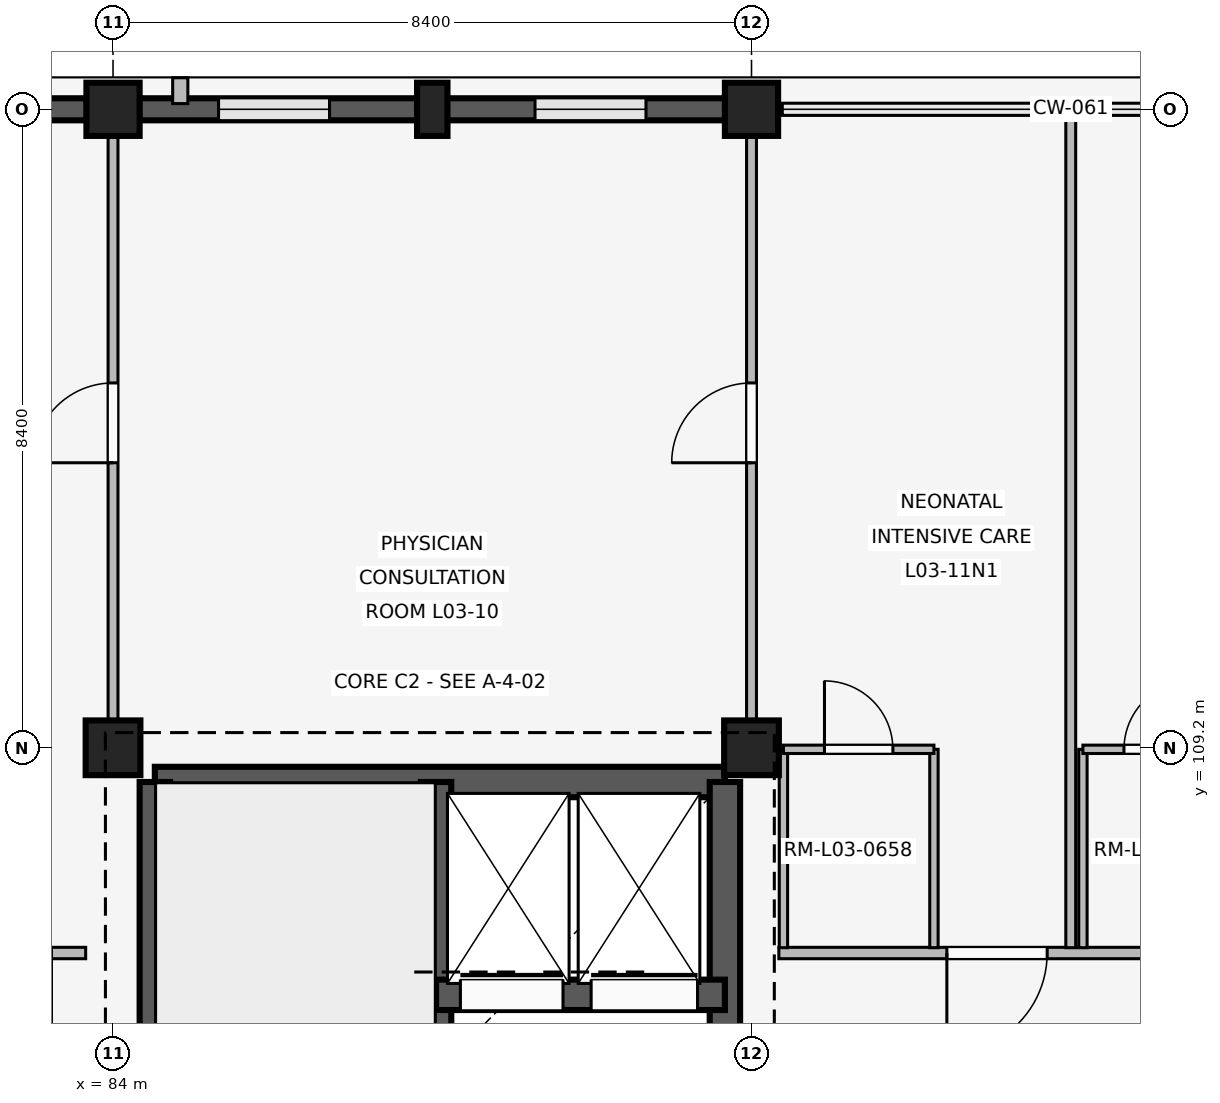
"""IFC4 building model, lengths in metres.
Left out: names, types, materials, properties, quantities, classifications, styles, units other than length and angle.
Written with IfcOpenShell. Run it as: python <this file> out.ifc"""

import sys

from ifc_helpers import new_model, si_unit, direction, frame, frame_2d, origin, origin_2d, place, context, subcontext, project, spatial, rectangle, extrude, element, fill, save


model = new_model("IFC4")
c1 = context("Model", 3, precision=1e-05, world=origin(), true_north=direction((0.0, 1.0)))
c2 = subcontext(c1, "Body", "Model", "MODEL_VIEW")
j1 = project(units=[si_unit("LENGTHUNIT", "METRE"), si_unit("PLANEANGLEUNIT", "RADIAN")], contexts=[c1])
p1 = place(None, origin())
s1 = spatial("IfcSite", under=j1, at=p1, CompositionType="ELEMENT")
p2 = place(p1, origin())
s2 = spatial("IfcBuilding", under=s1, at=p2, CompositionType="ELEMENT")
p3 = place(p2, frame((0.0, 0.0, 12.9)))
s3 = spatial("IfcBuildingStorey", under=s2, at=p3, CompositionType="ELEMENT", Elevation=12.9)
p4 = place(p3, frame((84.0, 109.2, 0.0), z_axis=(0.0, 0.0, 1.0), x_axis=(1.0, 0.0, 0.0)))
e1 = element("IfcColumn", 1, at=p4, inside=s3, PredefinedType="COLUMN", context=c2, shape_type="SweptSolid", body=[
    extrude(rectangle(XDim=0.72, YDim=0.72, at=origin_2d()), origin(), (0.0, 0.0, 1.0), 3.3),
])
p5 = place(p3, frame((84.0, 117.6, 0.0), z_axis=(0.0, 0.0, 1.0), x_axis=(1.0, 0.0, 0.0)))
e2 = element("IfcColumn", 2, at=p5, inside=s3, PredefinedType="COLUMN", context=c2, shape_type="SweptSolid", body=[
    extrude(rectangle(XDim=0.7, YDim=0.7, at=origin_2d()), origin(), (0.0, 0.0, 1.0), 3.3),
])
p6 = place(p3, frame((92.4, 109.2, 0.0), z_axis=(0.0, 0.0, 1.0), x_axis=(1.0, 0.0, 0.0)))
e3 = element("IfcColumn", 3, at=p6, inside=s3, PredefinedType="COLUMN", context=c2, shape_type="SweptSolid", body=[
    extrude(rectangle(XDim=0.72, YDim=0.72, at=origin_2d()), origin(), (0.0, 0.0, 1.0), 3.3),
])
p7 = place(p3, frame((92.4, 117.6, 0.0), z_axis=(0.0, 0.0, 1.0), x_axis=(1.0, 0.0, 0.0)))
e4 = element("IfcColumn", 4, at=p7, inside=s3, PredefinedType="COLUMN", context=c2, shape_type="SweptSolid", body=[
    extrude(rectangle(XDim=0.7, YDim=0.7, at=origin_2d()), origin(), (0.0, 0.0, 1.0), 3.3),
])
p8 = place(p3, frame((88.2, 117.6, 0.0), z_axis=(0.0, 0.0, 1.0), x_axis=(1.0, 0.0, 0.0)))
e5 = element("IfcColumn", 5, at=p8, inside=s3, PredefinedType="PILASTER", context=c2, shape_type="SweptSolid", body=[
    extrude(rectangle(XDim=0.4, YDim=0.7, at=origin_2d()), origin(), (0.0, 0.0, 1.0), 3.3),
])
p9 = place(p3, frame((75.945, 117.6, 0.0), z_axis=(0.0, 0.0, 1.0), x_axis=(1.0, 0.0, 0.0)))
e6 = element("IfcWall", 6, at=p9, inside=s3, PredefinedType="SOLIDWALL", context=c2, shape_type="SweptSolid", body=[
    extrude(rectangle(XDim=7.71, YDim=0.29, at=frame_2d((3.855, 0.0))), origin(), (0.0, 0.0, 1.0), 2.44),
])
p10 = place(p9, frame((0.963, 0.0, 0.85)))
e7 = element("IfcOpeningElement", 7, at=p10, cuts=e6, PredefinedType="OPENING", context=c2, shape_type="SweptSolid", body=[
    extrude(rectangle(XDim=1.62, YDim=0.95, at=frame_2d((0.81, 0.475))), frame((0.0, 0.155, 0.0), z_axis=(0.0, -1.0, 0.0), x_axis=(1.0, 0.0, 0.0)), (0.0, 0.0, 1.0), 0.31),
])
p11 = place(p9, frame((5.127, 0.0, 0.85)))
e8 = element("IfcOpeningElement", 8, at=p11, cuts=e6, PredefinedType="OPENING", context=c2, shape_type="SweptSolid", body=[
    extrude(rectangle(XDim=1.62, YDim=0.95, at=frame_2d((0.81, 0.475))), frame((0.0, 0.155, 0.0), z_axis=(0.0, -1.0, 0.0), x_axis=(1.0, 0.0, 0.0)), (0.0, 0.0, 1.0), 0.31),
])
p12 = place(p3, frame((84.345, 117.6, 0.0), z_axis=(0.0, 0.0, 1.0), x_axis=(1.0, 0.0, 0.0)))
e9 = element("IfcWall", 9, at=p12, inside=s3, PredefinedType="SOLIDWALL", context=c2, shape_type="SweptSolid", body=[
    extrude(rectangle(XDim=7.71, YDim=0.29, at=frame_2d((3.855, 0.0))), origin(), (0.0, 0.0, 1.0), 2.44),
])
p13 = place(p12, frame((1.043, 0.0, 0.85)))
e10 = element("IfcOpeningElement", 10, at=p13, cuts=e9, PredefinedType="OPENING", context=c2, shape_type="SweptSolid", body=[
    extrude(rectangle(XDim=1.46, YDim=0.85, at=frame_2d((0.73, 0.425))), frame((0.0, 0.155, 0.0), z_axis=(0.0, -1.0, 0.0), x_axis=(1.0, 0.0, 0.0)), (0.0, 0.0, 1.0), 0.31),
])
p14 = place(p12, frame((5.207, 0.0, 0.85)))
e11 = element("IfcOpeningElement", 11, at=p14, cuts=e9, PredefinedType="OPENING", context=c2, shape_type="SweptSolid", body=[
    extrude(rectangle(XDim=1.46, YDim=0.85, at=frame_2d((0.73, 0.425))), frame((0.0, 0.155, 0.0), z_axis=(0.0, -1.0, 0.0), x_axis=(1.0, 0.0, 0.0)), (0.0, 0.0, 1.0), 0.31),
])
p15 = place(p3, frame((84.885, 117.675, 0.0), z_axis=(0.0, 0.0, 1.0), x_axis=(0.0, 1.0, 0.0)))
e12 = element("IfcWall", 12, at=p15, inside=s3, PredefinedType="ELEMENTEDWALL", context=c2, shape_type="SweptSolid", body=[
    extrude(rectangle(XDim=0.34, YDim=0.2, at=frame_2d((0.17, 0.0))), origin(), (0.0, 0.0, 1.0), 2.42),
])
p16 = place(p3, frame((84.55, 108.75, 0.0), z_axis=(0.0, 0.0, 1.0), x_axis=(1.0, 0.0, 0.0)))
e13 = element("IfcWall", 13, at=p16, inside=s3, PredefinedType="SHEAR", context=c2, shape_type="SweptSolid", body=[
    extrude(rectangle(XDim=7.5, YDim=0.4, at=frame_2d((3.75, 0.0))), origin(), (0.0, 0.0, 1.0), 3.02),
])
p17 = place(p3, frame((84.55, 101.2, 0.0), z_axis=(0.0, 0.0, 1.0), x_axis=(0.0, 1.0, 0.0)))
e14 = element("IfcWall", 14, at=p17, inside=s3, PredefinedType="SHEAR", context=c2, shape_type="SweptSolid", body=[
    extrude(rectangle(XDim=7.55, YDim=0.4, at=frame_2d((3.775, 0.0))), origin(), (0.0, 0.0, 1.0), 3.02),
])
p18 = place(p17, frame((0.28, 0.0, 0.0)))
e15 = element("IfcOpeningElement", 15, at=p18, cuts=e14, PredefinedType="OPENING", context=c2, shape_type="SweptSolid", body=[
    extrude(rectangle(XDim=1.0, YDim=2.15, at=frame_2d((0.5, 1.075))), frame((0.0, 0.21, 0.0), z_axis=(0.0, -1.0, 0.0), x_axis=(1.0, 0.0, 0.0)), (0.0, 0.0, 1.0), 0.42),
])
p19 = place(p3, frame((92.05, 101.2, 0.0), z_axis=(0.0, 0.0, 1.0), x_axis=(0.0, 1.0, 0.0)))
e16 = element("IfcWall", 16, at=p19, inside=s3, PredefinedType="SHEAR", context=c2, shape_type="SweptSolid", body=[
    extrude(rectangle(XDim=7.55, YDim=0.4, at=frame_2d((3.775, 0.0))), origin(), (0.0, 0.0, 1.0), 3.02),
])
p20 = place(p19, frame((2.4, 0.0, 0.0)))
e17 = element("IfcOpeningElement", 17, at=p20, cuts=e16, PredefinedType="OPENING", context=c2, shape_type="SweptSolid", body=[
    extrude(rectangle(XDim=1.2, YDim=2.2, at=frame_2d((0.6, 1.1))), frame((0.0, 0.21, 0.0), z_axis=(0.0, -1.0, 0.0), x_axis=(1.0, 0.0, 0.0)), (0.0, 0.0, 1.0), 0.42),
])
p21 = place(p3, frame((88.25, 101.2, 0.0), z_axis=(0.0, 0.0, 1.0), x_axis=(0.0, 1.0, 0.0)))
e18 = element("IfcWall", 18, at=p21, inside=s3, PredefinedType="SHEAR", context=c2, shape_type="SweptSolid", body=[
    extrude(rectangle(XDim=7.55, YDim=0.4, at=frame_2d((3.775, 0.0))), origin(), (0.0, 0.0, 1.0), 3.02),
])
p22 = place(p21, frame((0.28, 0.0, 0.0)))
e19 = element("IfcOpeningElement", 19, at=p22, cuts=e18, PredefinedType="OPENING", context=c2, shape_type="SweptSolid", body=[
    extrude(rectangle(XDim=1.0, YDim=2.15, at=frame_2d((0.5, 1.075))), frame((0.0, 0.21, 0.0), z_axis=(0.0, -1.0, 0.0), x_axis=(1.0, 0.0, 0.0)), (0.0, 0.0, 1.0), 0.42),
])
p23 = place(p3, frame((88.25, 105.95, 0.0), z_axis=(0.0, 0.0, 1.0), x_axis=(1.0, 0.0, 0.0)))
e20 = element("IfcWall", 20, at=p23, inside=s3, PredefinedType="SHEAR", context=c2, shape_type="SweptSolid", body=[
    extrude(rectangle(XDim=3.8, YDim=0.4, at=frame_2d((1.9, 0.0))), origin(), (0.0, 0.0, 1.0), 3.02),
])
p24 = place(p23, frame((0.32, 0.0, 0.0)))
e21 = element("IfcOpeningElement", 21, at=p24, cuts=e20, PredefinedType="OPENING", context=c2, shape_type="SweptSolid", body=[
    extrude(rectangle(XDim=1.35, YDim=2.25, at=frame_2d((0.675, 1.125))), frame((0.0, 0.21, 0.0), z_axis=(0.0, -1.0, 0.0), x_axis=(1.0, 0.0, 0.0)), (0.0, 0.0, 1.0), 0.42),
])
p25 = place(p23, frame((2.04, 0.0, 0.0)))
e22 = element("IfcOpeningElement", 22, at=p25, cuts=e20, PredefinedType="OPENING", context=c2, shape_type="SweptSolid", body=[
    extrude(rectangle(XDim=1.4, YDim=2.25, at=frame_2d((0.7, 1.125))), frame((0.0, 0.21, 0.0), z_axis=(0.0, -1.0, 0.0), x_axis=(1.0, 0.0, 0.0)), (0.0, 0.0, 1.0), 0.42),
])
p26 = place(p3, frame((83.64, 106.5, 0.0), z_axis=(0.0, 0.0, 1.0), x_axis=(-1.0, 0.0, 0.0)))
e23 = element("IfcWall", 23, at=p26, inside=s3, PredefinedType="PARTITIONING", context=c2, shape_type="SweptSolid", body=[
    extrude(rectangle(XDim=7.96, YDim=0.15, at=frame_2d((3.98, 0.0))), origin(), (0.0, 0.0, 1.0), 2.42),
])
p27 = place(p26, frame((0.45, 0.0, 0.0)))
e24 = element("IfcOpeningElement", 24, at=p27, cuts=e23, PredefinedType="OPENING", context=c2, shape_type="SweptSolid", body=[
    extrude(rectangle(XDim=1.32, YDim=2.25, at=frame_2d((0.66, 1.125))), frame((0.0, 0.085, 0.0), z_axis=(0.0, -1.0, 0.0), x_axis=(1.0, 0.0, 0.0)), (0.0, 0.0, 1.0), 0.17),
])
p28 = place(p26, frame((4.15, 0.0, 0.0)))
e25 = element("IfcOpeningElement", 25, at=p28, cuts=e23, PredefinedType="OPENING", context=c2, shape_type="SweptSolid", body=[
    extrude(rectangle(XDim=1.32, YDim=2.25, at=frame_2d((0.66, 1.125))), frame((0.0, 0.085, 0.0), z_axis=(0.0, -1.0, 0.0), x_axis=(1.0, 0.0, 0.0)), (0.0, 0.0, 1.0), 0.17),
])
p29 = place(p3, frame((84.0, 109.55, 0.0), z_axis=(0.0, 0.0, 1.0), x_axis=(0.0, 1.0, 0.0)))
e26 = element("IfcWall", 26, at=p29, inside=s3, PredefinedType="PARTITIONING", context=c2, shape_type="SweptSolid", body=[
    extrude(rectangle(XDim=7.91, YDim=0.13, at=frame_2d((3.955, 0.0))), origin(), (0.0, 0.0, 1.0), 2.42),
])
p30 = place(p29, frame((3.4, 0.0, 0.0)))
e27 = element("IfcOpeningElement", 27, at=p30, cuts=e26, PredefinedType="OPENING", context=c2, shape_type="SweptSolid", body=[
    extrude(rectangle(XDim=1.05, YDim=2.2, at=frame_2d((0.525, 1.1))), frame((0.0, 0.075, 0.0), z_axis=(0.0, -1.0, 0.0), x_axis=(1.0, 0.0, 0.0)), (0.0, 0.0, 1.0), 0.15),
])
p31 = place(p3, frame((92.4, 109.55, 0.0), z_axis=(0.0, 0.0, 1.0), x_axis=(0.0, 1.0, 0.0)))
e28 = element("IfcWall", 28, at=p31, inside=s3, PredefinedType="PARTITIONING", context=c2, shape_type="SweptSolid", body=[
    extrude(rectangle(XDim=7.91, YDim=0.13, at=frame_2d((3.955, 0.0))), origin(), (0.0, 0.0, 1.0), 2.42),
])
p32 = place(p31, frame((3.4, 0.0, 0.0)))
e29 = element("IfcOpeningElement", 29, at=p32, cuts=e28, PredefinedType="OPENING", context=c2, shape_type="SweptSolid", body=[
    extrude(rectangle(XDim=1.05, YDim=2.2, at=frame_2d((0.525, 1.1))), frame((0.0, 0.075, 0.0), z_axis=(0.0, -1.0, 0.0), x_axis=(1.0, 0.0, 0.0)), (0.0, 0.0, 1.0), 0.15),
])
p33 = place(p3, frame((100.72, 106.5, 0.0), z_axis=(0.0, 0.0, 1.0), x_axis=(-1.0, 0.0, 0.0)))
e30 = element("IfcWall", 30, at=p33, inside=s3, PredefinedType="PARTITIONING", context=c2, shape_type="SweptSolid", body=[
    extrude(rectangle(XDim=7.96, YDim=0.15, at=frame_2d((3.98, 0.0))), origin(), (0.0, 0.0, 1.0), 2.42),
])
p34 = place(p33, frame((0.73, 0.0, 0.0)))
e31 = element("IfcOpeningElement", 31, at=p34, cuts=e30, PredefinedType="OPENING", context=c2, shape_type="SweptSolid", body=[
    extrude(rectangle(XDim=1.32, YDim=2.25, at=frame_2d((0.66, 1.125))), frame((0.0, 0.085, 0.0), z_axis=(0.0, -1.0, 0.0), x_axis=(1.0, 0.0, 0.0)), (0.0, 0.0, 1.0), 0.17),
])
p35 = place(p33, frame((4.43, 0.0, 0.0)))
e32 = element("IfcOpeningElement", 32, at=p35, cuts=e30, PredefinedType="OPENING", context=c2, shape_type="SweptSolid", body=[
    extrude(rectangle(XDim=1.32, YDim=2.25, at=frame_2d((0.66, 1.125))), frame((0.0, 0.085, 0.0), z_axis=(0.0, -1.0, 0.0), x_axis=(1.0, 0.0, 0.0)), (0.0, 0.0, 1.0), 0.17),
])
p36 = place(p3, frame((96.6, 106.57, 0.0), z_axis=(0.0, 0.0, 1.0), x_axis=(0.0, 1.0, 0.0)))
e33 = element("IfcWall", 33, at=p36, inside=s3, PredefinedType="PARTITIONING", context=c2, shape_type="SweptSolid", body=[
    extrude(rectangle(XDim=10.93, YDim=0.13, at=frame_2d((5.465, 0.0))), origin(), (0.0, 0.0, 1.0), 2.42),
])
for number, where, z_axis, x_axis in (
    (34, (92.82, 106.57, 0.0), (0.0, 0.0, 1.0), (0.0, 1.0, 0.0)),
    (35, (94.8, 106.57, 0.0), (0.0, 0.0, 1.0), (0.0, 1.0, 0.0)),
):
    element("IfcWall", number, at=place(p3, frame(where, z_axis=z_axis, x_axis=x_axis)), inside=s3, PredefinedType="PARTITIONING", context=c2, shape_type="SweptSolid", body=[
        extrude(rectangle(XDim=2.61, YDim=0.11, at=frame_2d((1.305, 0.0))), origin(), (0.0, 0.0, 1.0), 2.42),
    ])
p37 = place(p3, frame((92.82, 109.18, 0.0), z_axis=(0.0, 0.0, 1.0), x_axis=(1.0, 0.0, 0.0)))
e36 = element("IfcWall", 36, at=p37, inside=s3, PredefinedType="PARTITIONING", context=c2, shape_type="SweptSolid", body=[
    extrude(rectangle(XDim=1.98, YDim=0.11, at=frame_2d((0.99, 0.0))), origin(), (0.0, 0.0, 1.0), 2.42),
])
p38 = place(p37, frame((0.54, 0.0, 0.0)))
e37 = element("IfcOpeningElement", 37, at=p38, cuts=e36, PredefinedType="OPENING", context=c2, shape_type="SweptSolid", body=[
    extrude(rectangle(XDim=0.9, YDim=2.1, at=frame_2d((0.45, 1.05))), frame((0.0, 0.065, 0.0), z_axis=(0.0, -1.0, 0.0), x_axis=(1.0, 0.0, 0.0)), (0.0, 0.0, 1.0), 0.13),
])
p39 = place(p3, frame((96.76, 106.57, 0.0), z_axis=(0.0, 0.0, 1.0), x_axis=(0.0, 1.0, 0.0)))
e38 = element("IfcWall", 38, at=p39, inside=s3, PredefinedType="PARTITIONING", context=c2, shape_type="SweptSolid", body=[
    extrude(rectangle(XDim=2.61, YDim=0.11, at=frame_2d((1.305, 0.0))), origin(), (0.0, 0.0, 1.0), 2.42),
])
p40 = place(p3, frame((96.76, 109.18, 0.0), z_axis=(0.0, 0.0, 1.0), x_axis=(1.0, 0.0, 0.0)))
e39 = element("IfcWall", 39, at=p40, inside=s3, PredefinedType="PARTITIONING", context=c2, shape_type="SweptSolid", body=[
    extrude(rectangle(XDim=1.98, YDim=0.11, at=frame_2d((0.99, 0.0))), origin(), (0.0, 0.0, 1.0), 2.42),
])
p41 = place(p40, frame((0.54, 0.0, 0.0)))
e40 = element("IfcOpeningElement", 40, at=p41, cuts=e39, PredefinedType="OPENING", context=c2, shape_type="SweptSolid", body=[
    extrude(rectangle(XDim=0.9, YDim=2.1, at=frame_2d((0.45, 1.05))), frame((0.0, 0.065, 0.0), z_axis=(0.0, -1.0, 0.0), x_axis=(1.0, 0.0, 0.0)), (0.0, 0.0, 1.0), 0.13),
])
p42 = place(p13, origin())
e41 = element("IfcWindow", 41, at=p42, inside=s3, PartitioningType="SINGLE_PANEL", PredefinedType="WINDOW", context=c2, shape_type="SweptSolid", body=[
    extrude(rectangle(XDim=1.46, YDim=0.85, at=frame_2d((0.73, 0.425))), frame((0.0, 0.03, 0.0), z_axis=(0.0, -1.0, 0.0), x_axis=(1.0, 0.0, 0.0)), (0.0, 0.0, 1.0), 0.06),
])
fill(e10, e41)
p43 = place(p14, origin())
e42 = element("IfcWindow", 42, at=p43, inside=s3, PartitioningType="SINGLE_PANEL", PredefinedType="WINDOW", context=c2, shape_type="SweptSolid", body=[
    extrude(rectangle(XDim=1.46, YDim=0.85, at=frame_2d((0.73, 0.425))), frame((0.0, 0.03, 0.0), z_axis=(0.0, -1.0, 0.0), x_axis=(1.0, 0.0, 0.0)), (0.0, 0.0, 1.0), 0.06),
])
fill(e11, e42)
p44 = place(p24, origin())
e43 = element("IfcDoor", 43, at=p44, inside=s3, OperationType="SLIDING_TO_LEFT", PredefinedType="DOOR", context=c2, shape_type="SweptSolid", body=[
    extrude(rectangle(XDim=1.35, YDim=2.25, at=frame_2d((0.675, 1.125))), frame((0.0, 0.025, 0.0), z_axis=(0.0, -1.0, 0.0), x_axis=(1.0, 0.0, 0.0)), (0.0, 0.0, 1.0), 0.05),
])
fill(e21, e43)
p45 = place(p25, origin())
e44 = element("IfcDoor", 44, at=p45, inside=s3, OperationType="SLIDING_TO_LEFT", PredefinedType="DOOR", context=c2, shape_type="SweptSolid", body=[
    extrude(rectangle(XDim=1.4, YDim=2.25, at=frame_2d((0.7, 1.125))), frame((0.0, 0.025, 0.0), z_axis=(0.0, -1.0, 0.0), x_axis=(1.0, 0.0, 0.0)), (0.0, 0.0, 1.0), 0.05),
])
fill(e22, e44)
p46 = place(p30, origin())
e45 = element("IfcDoor", 45, at=p46, inside=s3, OperationType="SINGLE_SWING_LEFT", PredefinedType="DOOR", context=c2, shape_type="SweptSolid", body=[
    extrude(rectangle(XDim=1.05, YDim=2.2, at=frame_2d((0.525, 1.1))), frame((0.0, 0.025, 0.0), z_axis=(0.0, -1.0, 0.0), x_axis=(1.0, 0.0, 0.0)), (0.0, 0.0, 1.0), 0.05),
])
fill(e27, e45)
p47 = place(p32, origin())
e46 = element("IfcDoor", 46, at=p47, inside=s3, OperationType="SINGLE_SWING_LEFT", PredefinedType="DOOR", context=c2, shape_type="SweptSolid", body=[
    extrude(rectangle(XDim=1.05, YDim=2.2, at=frame_2d((0.525, 1.1))), frame((0.0, 0.025, 0.0), z_axis=(0.0, -1.0, 0.0), x_axis=(1.0, 0.0, 0.0)), (0.0, 0.0, 1.0), 0.05),
])
fill(e29, e46)
p48 = place(p35, origin())
e47 = element("IfcDoor", 47, at=p48, inside=s3, OperationType="SINGLE_SWING_RIGHT", PredefinedType="DOOR", context=c2, shape_type="SweptSolid", body=[
    extrude(rectangle(XDim=1.32, YDim=2.25, at=frame_2d((0.66, 1.125))), frame((0.0, 0.025, 0.0), z_axis=(0.0, -1.0, 0.0), x_axis=(1.0, 0.0, 0.0)), (0.0, 0.0, 1.0), 0.05),
])
fill(e32, e47)
p49 = place(p38, origin())
e48 = element("IfcDoor", 48, at=p49, inside=s3, OperationType="SINGLE_SWING_LEFT", PredefinedType="DOOR", context=c2, shape_type="SweptSolid", body=[
    extrude(rectangle(XDim=0.9, YDim=2.1, at=frame_2d((0.45, 1.05))), frame((0.0, 0.025, 0.0), z_axis=(0.0, -1.0, 0.0), x_axis=(1.0, 0.0, 0.0)), (0.0, 0.0, 1.0), 0.05),
])
fill(e37, e48)
p50 = place(p41, origin())
e49 = element("IfcDoor", 49, at=p50, inside=s3, OperationType="SINGLE_SWING_RIGHT", PredefinedType="DOOR", context=c2, shape_type="SweptSolid", body=[
    extrude(rectangle(XDim=0.9, YDim=2.1, at=frame_2d((0.45, 1.05))), frame((0.0, 0.025, 0.0), z_axis=(0.0, -1.0, 0.0), x_axis=(1.0, 0.0, 0.0)), (0.0, 0.0, 1.0), 0.05),
])
fill(e40, e49)
save(model, sys.argv[1])
